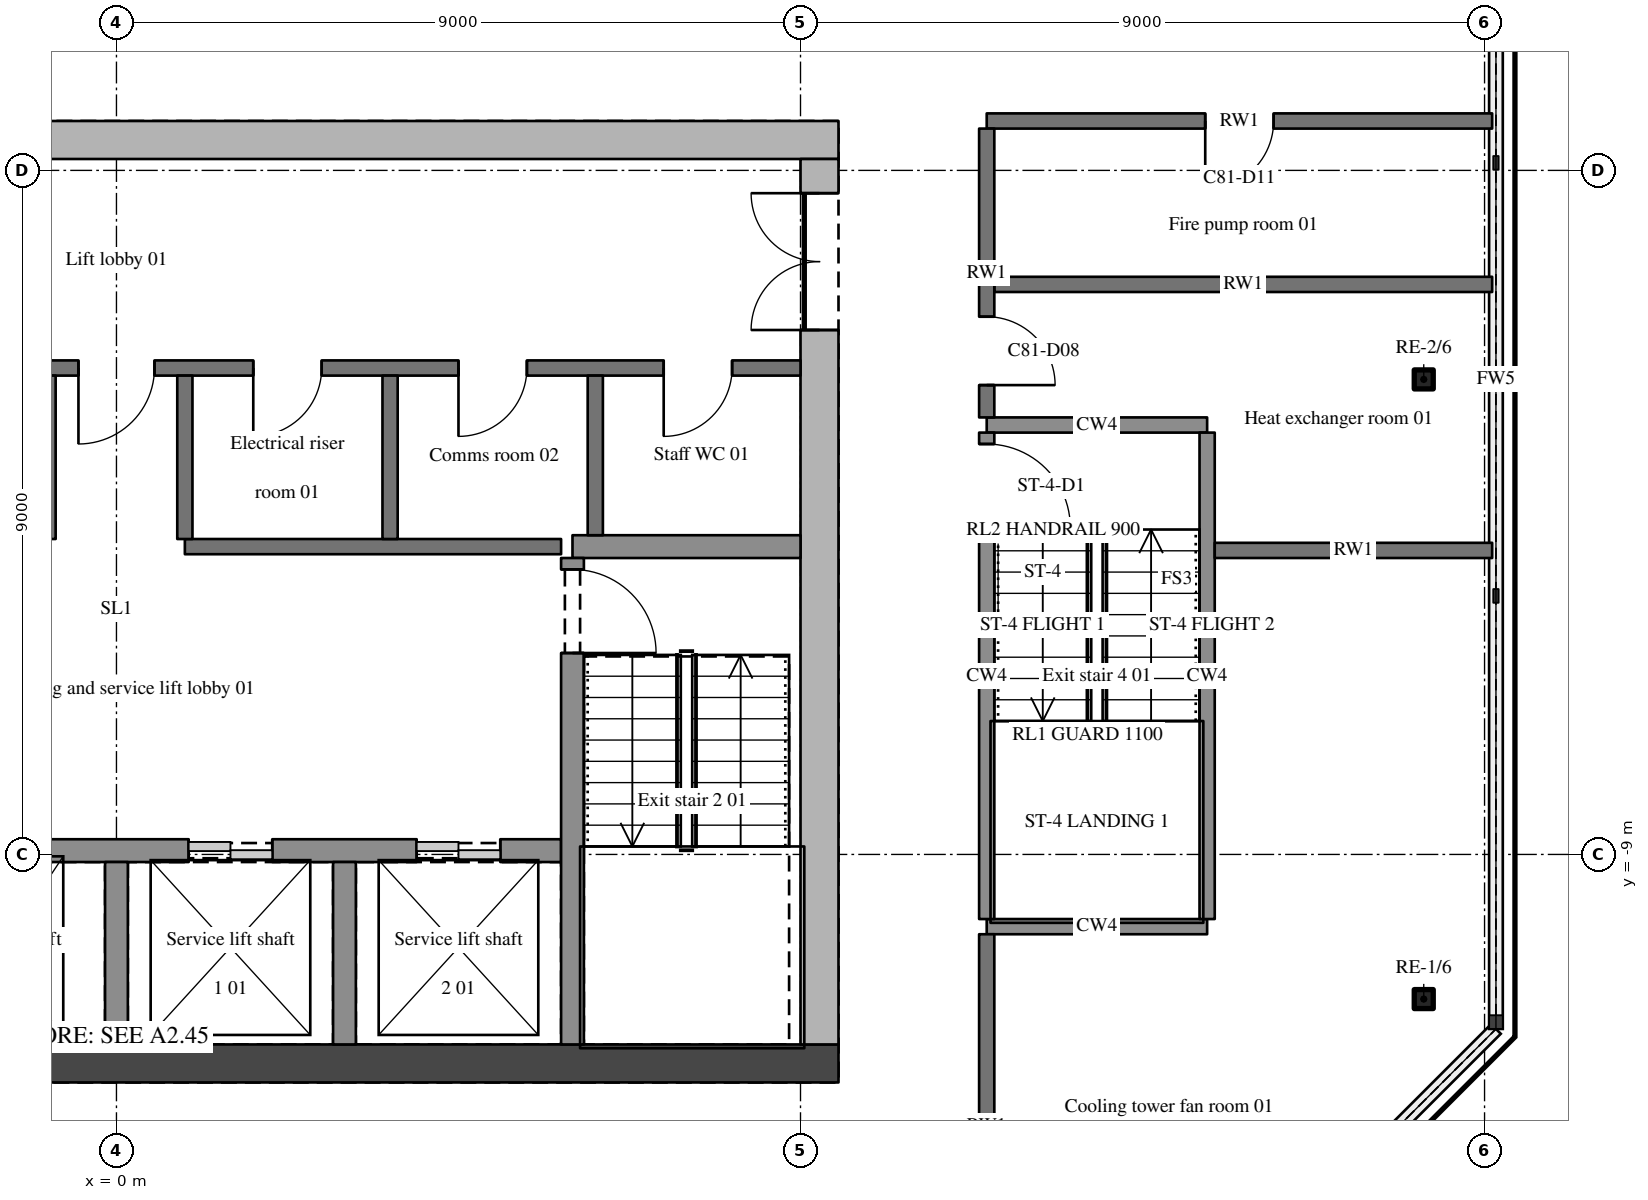
"""IFC4 building model, lengths in metres.
Left out: names, types, materials, properties, quantities, classifications, styles, units other than length and angle.
Written with IfcOpenShell. Run it as: python <this file> out.ifc"""

import sys

from ifc_helpers import new_model, si_unit, direction, frame, frame_2d, origin, origin_2d, place, context, subcontext, project, spatial, polyline, rectangle, hollow_rectangle, outline, extrude, element, fill, save


model = new_model("IFC4")
c1 = context("Model", 3, precision=1e-05, world=origin(), true_north=direction((0.0, 1.0)))
c2 = subcontext(c1, "Body", "Model", "MODEL_VIEW")
j1 = project(units=[si_unit("LENGTHUNIT", "METRE"), si_unit("PLANEANGLEUNIT", "RADIAN")], contexts=[c1])
p1 = place(None, origin())
s1 = spatial("IfcSite", under=j1, at=p1, CompositionType="ELEMENT")
p2 = place(p1, origin())
s2 = spatial("IfcBuilding", under=s1, at=p2, CompositionType="ELEMENT")
p3 = place(p2, frame((0.0, 0.0, 300.9)))
s3 = spatial("IfcBuildingStorey", under=s2, at=p3, CompositionType="ELEMENT", Elevation=300.9)
for number, where, z_axis, x_axis in (
    (1, (17.2, -10.903, 0.0), (0.0, 0.0, 1.0), (1.0, 0.0, 0.0)),
    (2, (17.2, -2.75, 0.0), (0.0, 0.0, 1.0), (1.0, 0.0, 0.0)),
):
    element("IfcColumn", number, at=place(p3, frame(where, z_axis=z_axis, x_axis=x_axis)), inside=s3, PredefinedType="COLUMN", context=c2, shape_type="SweptSolid", body=[
        extrude(hollow_rectangle(XDim=0.25, YDim=0.25, WallThickness=0.02, InnerFilletRadius=0.03, OuterFilletRadius=0.05, at=origin_2d()), origin(), (0.0, 0.0, 1.0), 3.6),
    ])
for number, where, z_axis, x_axis in (
    (3, (-9.5, -11.75, 0.0), (0.0, 0.0, 1.0), (1.0, 0.0, 0.0)),
    (4, (-9.5, 0.4, 0.0), (0.0, 0.0, 1.0), (1.0, 0.0, 0.0)),
):
    element("IfcWall", number, at=place(p3, frame(where, z_axis=z_axis, x_axis=x_axis)), inside=s3, PredefinedType="SHEAR", context=c2, shape_type="SweptSolid", body=[
        extrude(outline(polyline([(0.0, 0.0), (19.0, 0.0), (19.0, 3.6), (0.0, 3.6), (0.0, 0.0)])), frame((0.0, 0.25, 0.0), z_axis=(0.0, -1.0, 0.0), x_axis=(1.0, 0.0, 0.0)), (0.0, 0.0, 1.0), 0.5),
    ])
p4 = place(p3, frame((9.25, -11.5, 0.0), z_axis=(0.0, 0.0, 1.0), x_axis=(0.0, 1.0, 0.0)))
e5 = element("IfcWall", 5, at=p4, inside=s3, PredefinedType="SHEAR", context=c2, shape_type="SweptSolid", body=[
    extrude(outline(polyline([(0.0, 0.0), (11.65, 0.0), (11.65, 3.6), (0.0, 3.6), (0.0, 0.0)])), frame((0.0, 0.25, 0.0), z_axis=(0.0, -1.0, 0.0), x_axis=(1.0, 0.0, 0.0)), (0.0, 0.0, 1.0), 0.5),
])
p5 = place(p4, frame((9.4, 0.0, 0.0)))
e6 = element("IfcOpeningElement", 6, at=p5, cuts=e5, PredefinedType="OPENING", context=c2, shape_type="SweptSolid", body=[
    extrude(rectangle(XDim=1.8, YDim=2.1, at=frame_2d((0.9, 1.05))), frame((0.0, 0.26, 0.0), z_axis=(0.0, -1.0, 0.0), x_axis=(1.0, 0.0, 0.0)), (0.0, 0.0, 1.0), 0.52),
])
p6 = place(p3, frame((11.45, -9.95, 0.0), z_axis=(0.0, 0.0, 1.0), x_axis=(1.0, 0.0, 0.0)))
e7 = element("IfcWall", 7, at=p6, inside=s3, PredefinedType="SHEAR", context=c2, shape_type="SweptSolid", body=[
    extrude(rectangle(XDim=2.9, YDim=0.2, at=frame_2d((1.45, 0.0))), origin(), (0.0, 0.0, 1.0), 3.6),
])
p7 = place(p3, frame((-5.85, -8.95, 0.0), z_axis=(0.0, 0.0, 1.0), x_axis=(1.0, 0.0, 0.0)))
e8 = element("IfcWall", 8, at=p7, inside=s3, PredefinedType="SHEAR", context=c2, shape_type="SweptSolid", body=[
    extrude(rectangle(XDim=11.7, YDim=0.3, at=frame_2d((5.85, 0.0))), origin(), (0.0, 0.0, 1.0), 3.6),
])
p8 = place(p7, frame((0.8, 0.0, 0.0)))
e9 = element("IfcOpeningElement", 9, at=p8, cuts=e8, PredefinedType="OPENING", context=c2, shape_type="SweptSolid", body=[
    extrude(rectangle(XDim=1.1, YDim=2.1, at=frame_2d((0.55, 1.05))), frame((0.0, 0.16, 0.0), z_axis=(0.0, -1.0, 0.0), x_axis=(1.0, 0.0, 0.0)), (0.0, 0.0, 1.0), 0.32),
])
p9 = place(p7, frame((3.8, 0.0, 0.0)))
e10 = element("IfcOpeningElement", 10, at=p9, cuts=e8, PredefinedType="OPENING", context=c2, shape_type="SweptSolid", body=[
    extrude(rectangle(XDim=1.1, YDim=2.1, at=frame_2d((0.55, 1.05))), frame((0.0, 0.16, 0.0), z_axis=(0.0, -1.0, 0.0), x_axis=(1.0, 0.0, 0.0)), (0.0, 0.0, 1.0), 0.32),
])
p10 = place(p7, frame((6.8, 0.0, 0.0)))
e11 = element("IfcOpeningElement", 11, at=p10, cuts=e8, PredefinedType="OPENING", context=c2, shape_type="SweptSolid", body=[
    extrude(rectangle(XDim=1.1, YDim=2.1, at=frame_2d((0.55, 1.05))), frame((0.0, 0.16, 0.0), z_axis=(0.0, -1.0, 0.0), x_axis=(1.0, 0.0, 0.0)), (0.0, 0.0, 1.0), 0.32),
])
p11 = place(p7, frame((9.8, 0.0, 0.0)))
e12 = element("IfcOpeningElement", 12, at=p11, cuts=e8, PredefinedType="OPENING", context=c2, shape_type="SweptSolid", body=[
    extrude(rectangle(XDim=1.1, YDim=2.1, at=frame_2d((0.55, 1.05))), frame((0.0, 0.16, 0.0), z_axis=(0.0, -1.0, 0.0), x_axis=(1.0, 0.0, 0.0)), (0.0, 0.0, 1.0), 0.32),
])
p12 = place(p3, frame((14.45, -5.0, 0.0), z_axis=(0.0, 0.0, 1.0), x_axis=(1.0, 0.0, 0.0)))
e13 = element("IfcWall", 13, at=p12, inside=s3, PredefinedType="SOLIDWALL", context=c2, shape_type="SweptSolid", body=[
    extrude(rectangle(XDim=3.65, YDim=0.2, at=frame_2d((1.825, 0.0))), origin(), (0.0, 0.0, 1.0), 2.66),
])
p13 = place(p3, frame((0.9, -4.95, 0.0), z_axis=(0.0, 0.0, 1.0), x_axis=(1.0, 0.0, 0.0)))
e14 = element("IfcWall", 14, at=p13, inside=s3, PredefinedType="SOLIDWALL", context=c2, shape_type="SweptSolid", body=[
    extrude(rectangle(XDim=4.95, YDim=0.2, at=frame_2d((2.475, 0.0))), origin(), (0.0, 0.0, 1.0), 3.3),
])
p14 = place(p3, frame((6.0, -4.95, 0.0), z_axis=(0.0, 0.0, 1.0), x_axis=(1.0, 0.0, 0.0)))
e15 = element("IfcWall", 15, at=p14, inside=s3, PredefinedType="SHEAR", context=c2, shape_type="SweptSolid", body=[
    extrude(rectangle(XDim=3.0, YDim=0.3, at=frame_2d((1.5, 0.0))), origin(), (0.0, 0.0, 1.0), 3.6),
])
p15 = place(p3, frame((11.45, -3.35, 0.0), z_axis=(0.0, 0.0, 1.0), x_axis=(1.0, 0.0, 0.0)))
e16 = element("IfcWall", 16, at=p15, inside=s3, PredefinedType="SHEAR", context=c2, shape_type="SweptSolid", body=[
    extrude(rectangle(XDim=2.9, YDim=0.2, at=frame_2d((1.45, 0.0))), origin(), (0.0, 0.0, 1.0), 3.6),
])
p16 = place(p3, frame((9.0, -2.6, 0.0), z_axis=(0.0, 0.0, 1.0), x_axis=(-1.0, 0.0, 0.0)))
e17 = element("IfcWall", 17, at=p16, inside=s3, PredefinedType="SOLIDWALL", context=c2, shape_type="SweptSolid", body=[
    extrude(rectangle(XDim=18.0, YDim=0.2, at=frame_2d((9.0, 0.0))), origin(), (0.0, 0.0, 1.0), 3.3),
])
p17 = place(p16, frame((8.5, 0.0, 0.0)))
e18 = element("IfcOpeningElement", 18, at=p17, cuts=e17, PredefinedType="OPENING", context=c2, shape_type="SweptSolid", body=[
    extrude(rectangle(XDim=1.0, YDim=2.1, at=frame_2d((0.5, 1.05))), frame((0.0, 0.11, 0.0), z_axis=(0.0, -1.0, 0.0), x_axis=(1.0, 0.0, 0.0)), (0.0, 0.0, 1.0), 0.22),
])
p18 = place(p16, frame((16.2, 0.0, 0.0)))
e19 = element("IfcOpeningElement", 19, at=p18, cuts=e17, PredefinedType="OPENING", context=c2, shape_type="SweptSolid", body=[
    extrude(rectangle(XDim=0.9, YDim=2.1, at=frame_2d((0.45, 1.05))), frame((0.0, 0.11, 0.0), z_axis=(0.0, -1.0, 0.0), x_axis=(1.0, 0.0, 0.0)), (0.0, 0.0, 1.0), 0.22),
])
p19 = place(p16, frame((13.5, 0.0, 0.0)))
e20 = element("IfcOpeningElement", 20, at=p19, cuts=e17, PredefinedType="OPENING", context=c2, shape_type="SweptSolid", body=[
    extrude(rectangle(XDim=0.9, YDim=2.1, at=frame_2d((0.45, 1.05))), frame((0.0, 0.11, 0.0), z_axis=(0.0, -1.0, 0.0), x_axis=(1.0, 0.0, 0.0)), (0.0, 0.0, 1.0), 0.22),
])
p20 = place(p16, frame((10.8, 0.0, 0.0)))
e21 = element("IfcOpeningElement", 21, at=p20, cuts=e17, PredefinedType="OPENING", context=c2, shape_type="SweptSolid", body=[
    extrude(rectangle(XDim=0.9, YDim=2.1, at=frame_2d((0.45, 1.05))), frame((0.0, 0.11, 0.0), z_axis=(0.0, -1.0, 0.0), x_axis=(1.0, 0.0, 0.0)), (0.0, 0.0, 1.0), 0.22),
])
p21 = place(p16, frame((6.3, 0.0, 0.0)))
e22 = element("IfcOpeningElement", 22, at=p21, cuts=e17, PredefinedType="OPENING", context=c2, shape_type="SweptSolid", body=[
    extrude(rectangle(XDim=0.9, YDim=2.1, at=frame_2d((0.45, 1.05))), frame((0.0, 0.11, 0.0), z_axis=(0.0, -1.0, 0.0), x_axis=(1.0, 0.0, 0.0)), (0.0, 0.0, 1.0), 0.22),
])
p22 = place(p16, frame((3.6, 0.0, 0.0)))
e23 = element("IfcOpeningElement", 23, at=p22, cuts=e17, PredefinedType="OPENING", context=c2, shape_type="SweptSolid", body=[
    extrude(rectangle(XDim=0.9, YDim=2.1, at=frame_2d((0.45, 1.05))), frame((0.0, 0.11, 0.0), z_axis=(0.0, -1.0, 0.0), x_axis=(1.0, 0.0, 0.0)), (0.0, 0.0, 1.0), 0.22),
])
p23 = place(p16, frame((0.9, 0.0, 0.0)))
e24 = element("IfcOpeningElement", 24, at=p23, cuts=e17, PredefinedType="OPENING", context=c2, shape_type="SweptSolid", body=[
    extrude(rectangle(XDim=0.9, YDim=2.1, at=frame_2d((0.45, 1.05))), frame((0.0, 0.11, 0.0), z_axis=(0.0, -1.0, 0.0), x_axis=(1.0, 0.0, 0.0)), (0.0, 0.0, 1.0), 0.22),
])
p24 = place(p3, frame((11.55, -1.5, 0.0), z_axis=(0.0, 0.0, 1.0), x_axis=(1.0, 0.0, 0.0)))
e25 = element("IfcWall", 25, at=p24, inside=s3, PredefinedType="SOLIDWALL", context=c2, shape_type="SweptSolid", body=[
    extrude(rectangle(XDim=6.55, YDim=0.2, at=frame_2d((3.275, 0.0))), origin(), (0.0, 0.0, 1.0), 2.66),
])
p25 = place(p3, frame((18.1, 0.65, 0.0), z_axis=(0.0, 0.0, 1.0), x_axis=(-1.0, 0.0, 0.0)))
e26 = element("IfcWall", 26, at=p25, inside=s3, PredefinedType="SOLIDWALL", context=c2, shape_type="SweptSolid", body=[
    extrude(rectangle(XDim=6.65, YDim=0.2, at=frame_2d((3.325, 0.0))), origin(), (0.0, 0.0, 1.0), 2.66),
])
p26 = place(p25, frame((2.875, 0.0, 0.0)))
e27 = element("IfcOpeningElement", 27, at=p26, cuts=e26, PredefinedType="OPENING", context=c2, shape_type="SweptSolid", body=[
    extrude(rectangle(XDim=0.9, YDim=2.1, at=frame_2d((0.45, 1.05))), frame((0.0, 0.11, 0.0), z_axis=(0.0, -1.0, 0.0), x_axis=(1.0, 0.0, 0.0)), (0.0, 0.0, 1.0), 0.22),
])
p27 = place(p3, frame((-0.9, -4.85, 0.0), z_axis=(0.0, 0.0, 1.0), x_axis=(0.0, 1.0, 0.0)))
e28 = element("IfcWall", 28, at=p27, inside=s3, PredefinedType="SOLIDWALL", context=c2, shape_type="SweptSolid", body=[
    extrude(rectangle(XDim=2.15, YDim=0.2, at=frame_2d((1.075, 0.0))), origin(), (0.0, 0.0, 1.0), 3.3),
])
p28 = place(p3, frame((0.0, -11.5, 0.0), z_axis=(0.0, 0.0, 1.0), x_axis=(0.0, 1.0, 0.0)))
e29 = element("IfcWall", 29, at=p28, inside=s3, PredefinedType="SHEAR", context=c2, shape_type="SweptSolid", body=[
    extrude(rectangle(XDim=2.4, YDim=0.3, at=frame_2d((1.2, 0.0))), origin(), (0.0, 0.0, 1.0), 3.6),
])
p29 = place(p3, frame((0.9, -4.85, 0.0), z_axis=(0.0, 0.0, 1.0), x_axis=(0.0, 1.0, 0.0)))
e30 = element("IfcWall", 30, at=p29, inside=s3, PredefinedType="SOLIDWALL", context=c2, shape_type="SweptSolid", body=[
    extrude(rectangle(XDim=2.15, YDim=0.2, at=frame_2d((1.075, 0.0))), origin(), (0.0, 0.0, 1.0), 3.3),
])
p30 = place(p3, frame((3.0, -11.5, 0.0), z_axis=(0.0, 0.0, 1.0), x_axis=(0.0, 1.0, 0.0)))
e31 = element("IfcWall", 31, at=p30, inside=s3, PredefinedType="SHEAR", context=c2, shape_type="SweptSolid", body=[
    extrude(rectangle(XDim=2.4, YDim=0.3, at=frame_2d((1.2, 0.0))), origin(), (0.0, 0.0, 1.0), 3.6),
])
p31 = place(p3, frame((3.6, -4.85, 0.0), z_axis=(0.0, 0.0, 1.0), x_axis=(0.0, 1.0, 0.0)))
e32 = element("IfcWall", 32, at=p31, inside=s3, PredefinedType="SOLIDWALL", context=c2, shape_type="SweptSolid", body=[
    extrude(rectangle(XDim=2.15, YDim=0.2, at=frame_2d((1.075, 0.0))), origin(), (0.0, 0.0, 1.0), 3.3),
])
p32 = place(p3, frame((6.0, -5.1, 0.0), z_axis=(0.0, 0.0, 1.0), x_axis=(0.0, -1.0, 0.0)))
e33 = element("IfcWall", 33, at=p32, inside=s3, PredefinedType="SHEAR", context=c2, shape_type="SweptSolid", body=[
    extrude(rectangle(XDim=6.4, YDim=0.3, at=frame_2d((3.2, 0.0))), origin(), (0.0, 0.0, 1.0), 3.6),
])
p33 = place(p32, frame((0.15, 0.0, 0.0)))
e34 = element("IfcOpeningElement", 34, at=p33, cuts=e33, PredefinedType="OPENING", context=c2, shape_type="SweptSolid", body=[
    extrude(rectangle(XDim=1.1, YDim=2.1, at=frame_2d((0.55, 1.05))), frame((0.0, 0.16, 0.0), z_axis=(0.0, -1.0, 0.0), x_axis=(1.0, 0.0, 0.0)), (0.0, 0.0, 1.0), 0.32),
])
p34 = place(p3, frame((6.3, -4.8, 0.0), z_axis=(0.0, 0.0, 1.0), x_axis=(0.0, 1.0, 0.0)))
e35 = element("IfcWall", 35, at=p34, inside=s3, PredefinedType="SOLIDWALL", context=c2, shape_type="SweptSolid", body=[
    extrude(rectangle(XDim=2.1, YDim=0.2, at=frame_2d((1.05, 0.0))), origin(), (0.0, 0.0, 1.0), 3.3),
])
p35 = place(p3, frame((11.45, -10.05, 0.0), z_axis=(0.0, 0.0, 1.0), x_axis=(0.0, -1.0, 0.0)))
e36 = element("IfcWall", 36, at=p35, inside=s3, PredefinedType="SOLIDWALL", context=c2, shape_type="SweptSolid", body=[
    extrude(rectangle(XDim=5.05, YDim=0.2, at=frame_2d((2.525, 0.0))), origin(), (0.0, 0.0, 1.0), 2.66),
])
p36 = place(p35, frame((3.05, 0.0, 0.0)))
e37 = element("IfcOpeningElement", 37, at=p36, cuts=e36, PredefinedType="OPENING", context=c2, shape_type="SweptSolid", body=[
    extrude(rectangle(XDim=0.9, YDim=2.1, at=frame_2d((0.45, 1.05))), frame((0.0, 0.11, 0.0), z_axis=(0.0, -1.0, 0.0), x_axis=(1.0, 0.0, 0.0)), (0.0, 0.0, 1.0), 0.22),
])
p37 = place(p3, frame((11.45, -3.45, 0.0), z_axis=(0.0, 0.0, 1.0), x_axis=(0.0, -1.0, 0.0)))
e38 = element("IfcWall", 38, at=p37, inside=s3, PredefinedType="SHEAR", context=c2, shape_type="SweptSolid", body=[
    extrude(rectangle(XDim=6.4, YDim=0.2, at=frame_2d((3.2, 0.0))), origin(), (0.0, 0.0, 1.0), 3.6),
])
p38 = place(p37, frame((0.15, 0.0, 0.0)))
e39 = element("IfcOpeningElement", 39, at=p38, cuts=e38, PredefinedType="OPENING", context=c2, shape_type="SweptSolid", body=[
    extrude(rectangle(XDim=1.1, YDim=2.1, at=frame_2d((0.55, 1.05))), frame((0.0, 0.11, 0.0), z_axis=(0.0, -1.0, 0.0), x_axis=(1.0, 0.0, 0.0)), (0.0, 0.0, 1.0), 0.22),
])
p39 = place(p3, frame((11.45, 0.55, 0.0), z_axis=(0.0, 0.0, 1.0), x_axis=(0.0, -1.0, 0.0)))
e40 = element("IfcWall", 40, at=p39, inside=s3, PredefinedType="SOLIDWALL", context=c2, shape_type="SweptSolid", body=[
    extrude(rectangle(XDim=3.8, YDim=0.2, at=frame_2d((1.9, 0.0))), origin(), (0.0, 0.0, 1.0), 2.66),
])
p40 = place(p39, frame((2.475, 0.0, 0.0)))
e41 = element("IfcOpeningElement", 41, at=p40, cuts=e40, PredefinedType="OPENING", context=c2, shape_type="SweptSolid", body=[
    extrude(rectangle(XDim=0.9, YDim=2.1, at=frame_2d((0.45, 1.05))), frame((0.0, 0.11, 0.0), z_axis=(0.0, -1.0, 0.0), x_axis=(1.0, 0.0, 0.0)), (0.0, 0.0, 1.0), 0.22),
])
p41 = place(p3, frame((14.35, -9.85, 0.0), z_axis=(0.0, 0.0, 1.0), x_axis=(0.0, 1.0, 0.0)))
e42 = element("IfcWall", 42, at=p41, inside=s3, PredefinedType="SHEAR", context=c2, shape_type="SweptSolid", body=[
    extrude(rectangle(XDim=6.4, YDim=0.2, at=frame_2d((3.2, 0.0))), origin(), (0.0, 0.0, 1.0), 3.6),
])
p42 = place(p5, origin())
e43 = element("IfcDoor", 43, at=p42, inside=s3, OperationType="DOUBLE_DOOR_SINGLE_SWING", PredefinedType="DOOR", context=c2, shape_type="SweptSolid", body=[
    extrude(rectangle(XDim=1.8, YDim=2.1, at=frame_2d((0.9, 1.05))), frame((0.0, 0.025, 0.0), z_axis=(0.0, -1.0, 0.0), x_axis=(1.0, 0.0, 0.0)), (0.0, 0.0, 1.0), 0.05),
])
fill(e6, e43)
p43 = place(p17, origin())
e44 = element("IfcDoor", 44, at=p43, inside=s3, OperationType="SINGLE_SWING_RIGHT", PredefinedType="DOOR", context=c2, shape_type="SweptSolid", body=[
    extrude(rectangle(XDim=1.0, YDim=2.1, at=frame_2d((0.5, 1.05))), frame((0.0, 0.025, 0.0), z_axis=(0.0, -1.0, 0.0), x_axis=(1.0, 0.0, 0.0)), (0.0, 0.0, 1.0), 0.05),
])
fill(e18, e44)
p44 = place(p33, origin())
e45 = element("IfcDoor", 45, at=p44, inside=s3, OperationType="SINGLE_SWING_RIGHT", PredefinedType="DOOR", context=c2, shape_type="SweptSolid", body=[
    extrude(rectangle(XDim=1.1, YDim=2.1, at=frame_2d((0.55, 1.05))), frame((0.0, 0.025, 0.0), z_axis=(0.0, -1.0, 0.0), x_axis=(1.0, 0.0, 0.0)), (0.0, 0.0, 1.0), 0.05),
])
fill(e34, e45)
p45 = place(p38, origin())
e46 = element("IfcDoor", 46, at=p45, inside=s3, OperationType="SINGLE_SWING_RIGHT", PredefinedType="DOOR", context=c2, shape_type="SweptSolid", body=[
    extrude(rectangle(XDim=1.1, YDim=2.1, at=frame_2d((0.55, 1.05))), frame((0.0, 0.025, 0.0), z_axis=(0.0, -1.0, 0.0), x_axis=(1.0, 0.0, 0.0)), (0.0, 0.0, 1.0), 0.05),
])
fill(e39, e46)
p46 = place(p21, origin())
e47 = element("IfcDoor", 47, at=p46, inside=s3, OperationType="SINGLE_SWING_RIGHT", PredefinedType="DOOR", context=c2, shape_type="SweptSolid", body=[
    extrude(rectangle(XDim=0.9, YDim=2.1, at=frame_2d((0.45, 1.05))), frame((0.0, 0.025, 0.0), z_axis=(0.0, -1.0, 0.0), x_axis=(1.0, 0.0, 0.0)), (0.0, 0.0, 1.0), 0.05),
])
fill(e22, e47)
p47 = place(p22, origin())
e48 = element("IfcDoor", 48, at=p47, inside=s3, OperationType="SINGLE_SWING_RIGHT", PredefinedType="DOOR", context=c2, shape_type="SweptSolid", body=[
    extrude(rectangle(XDim=0.9, YDim=2.1, at=frame_2d((0.45, 1.05))), frame((0.0, 0.025, 0.0), z_axis=(0.0, -1.0, 0.0), x_axis=(1.0, 0.0, 0.0)), (0.0, 0.0, 1.0), 0.05),
])
fill(e23, e48)
p48 = place(p23, origin())
e49 = element("IfcDoor", 49, at=p48, inside=s3, OperationType="SINGLE_SWING_RIGHT", PredefinedType="DOOR", context=c2, shape_type="SweptSolid", body=[
    extrude(rectangle(XDim=0.9, YDim=2.1, at=frame_2d((0.45, 1.05))), frame((0.0, 0.025, 0.0), z_axis=(0.0, -1.0, 0.0), x_axis=(1.0, 0.0, 0.0)), (0.0, 0.0, 1.0), 0.05),
])
fill(e24, e49)
p49 = place(p40, origin())
e50 = element("IfcDoor", 50, at=p49, inside=s3, OperationType="SINGLE_SWING_RIGHT", PredefinedType="DOOR", context=c2, shape_type="SweptSolid", body=[
    extrude(rectangle(XDim=0.9, YDim=2.1, at=frame_2d((0.45, 1.05))), frame((0.0, 0.025, 0.0), z_axis=(0.0, -1.0, 0.0), x_axis=(1.0, 0.0, 0.0)), (0.0, 0.0, 1.0), 0.05),
])
fill(e41, e50)
p50 = place(p26, origin())
e51 = element("IfcDoor", 51, at=p50, inside=s3, OperationType="SINGLE_SWING_RIGHT", PredefinedType="DOOR", context=c2, shape_type="SweptSolid", body=[
    extrude(rectangle(XDim=0.9, YDim=2.1, at=frame_2d((0.45, 1.05))), frame((0.0, 0.025, 0.0), z_axis=(0.0, -1.0, 0.0), x_axis=(1.0, 0.0, 0.0)), (0.0, 0.0, 1.0), 0.05),
])
fill(e27, e51)
p51 = place(p10, origin())
e52 = element("IfcDoor", 52, at=p51, inside=s3, OperationType="DOUBLE_DOOR_SLIDING", PredefinedType="DOOR", context=c2, shape_type="SweptSolid", body=[
    extrude(rectangle(XDim=1.1, YDim=2.1, at=frame_2d((0.55, 1.05))), frame((0.0, 0.025, 0.0), z_axis=(0.0, -1.0, 0.0), x_axis=(1.0, 0.0, 0.0)), (0.0, 0.0, 1.0), 0.05),
])
fill(e11, e52)
p52 = place(p11, origin())
e53 = element("IfcDoor", 53, at=p52, inside=s3, OperationType="DOUBLE_DOOR_SLIDING", PredefinedType="DOOR", context=c2, shape_type="SweptSolid", body=[
    extrude(rectangle(XDim=1.1, YDim=2.1, at=frame_2d((0.55, 1.05))), frame((0.0, 0.025, 0.0), z_axis=(0.0, -1.0, 0.0), x_axis=(1.0, 0.0, 0.0)), (0.0, 0.0, 1.0), 0.05),
])
fill(e12, e53)
save(model, sys.argv[1])
